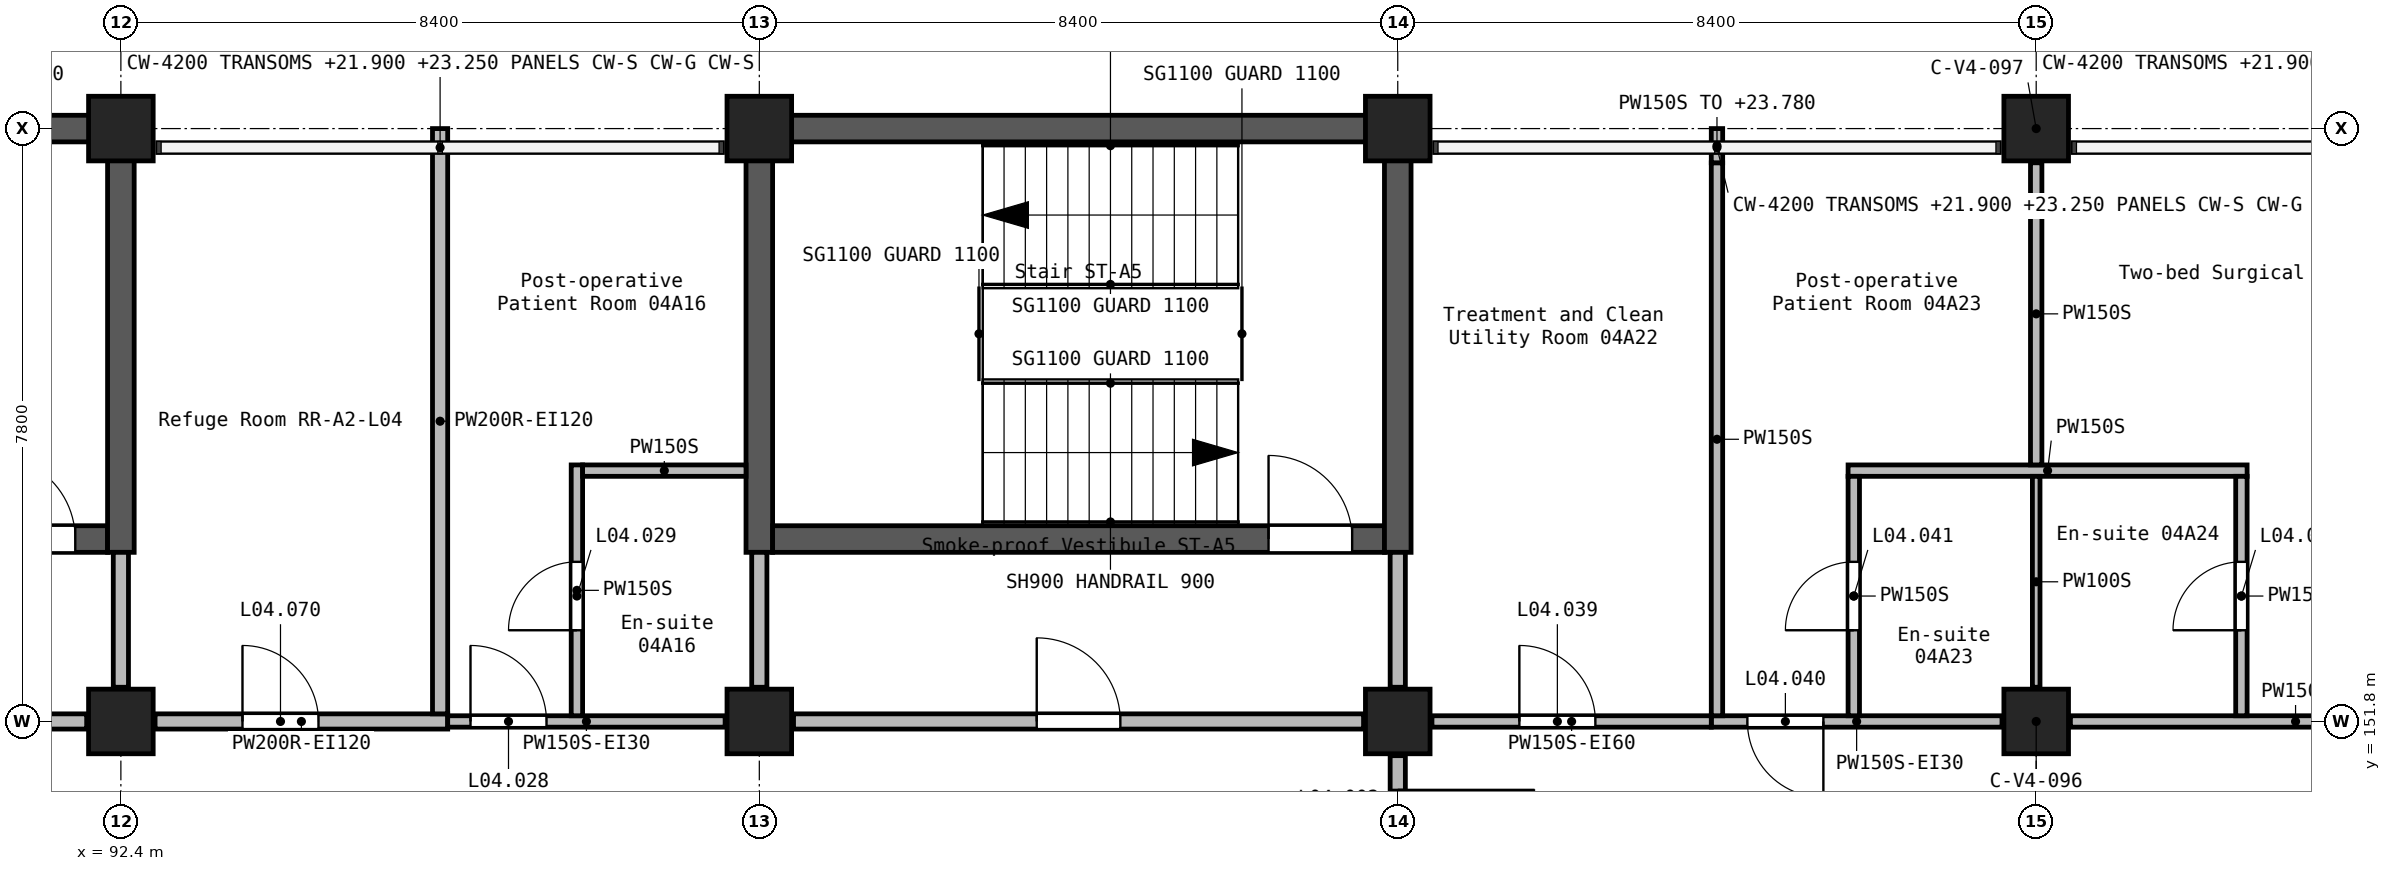
"""IFC4 building model, lengths in metres.
Left out: names, types, materials, properties, quantities, classifications, styles, units other than length and angle.
Written with IfcOpenShell. Run it as: python <this file> out.ifc"""

import sys

from ifc_helpers import new_model, si_unit, direction, frame, frame_2d, origin, origin_2d, place, context, subcontext, project, spatial, rectangle, extrude, element, fill, save


model = new_model("IFC4")
c1 = context("Model", 3, precision=1e-05, world=origin(), true_north=direction((0.0, 1.0)))
c2 = subcontext(c1, "Body", "Model", "MODEL_VIEW")
j1 = project(units=[si_unit("LENGTHUNIT", "METRE"), si_unit("PLANEANGLEUNIT", "RADIAN")], contexts=[c1])
p1 = place(None, origin())
s1 = spatial("IfcSite", under=j1, at=p1, CompositionType="ELEMENT")
p2 = place(p1, origin())
s2 = spatial("IfcBuilding", under=s1, at=p2, CompositionType="ELEMENT")
p3 = place(p2, frame((0.0, 0.0, 21.0)))
s3 = spatial("IfcBuildingStorey", under=s2, at=p3, CompositionType="ELEMENT", Elevation=21.0)
for number, where, z_axis, x_axis in (
    (1, (92.4, 151.8, 0.0), (0.0, 0.0, 1.0), (1.0, 0.0, 0.0)),
    (2, (92.4, 159.6, 0.0), (0.0, 0.0, 1.0), (1.0, 0.0, 0.0)),
    (3, (100.8, 151.8, 0.0), (0.0, 0.0, 1.0), (1.0, 0.0, 0.0)),
    (4, (100.8, 159.6, 0.0), (0.0, 0.0, 1.0), (1.0, 0.0, 0.0)),
    (5, (109.2, 151.8, 0.0), (0.0, 0.0, 1.0), (1.0, 0.0, 0.0)),
    (6, (109.2, 159.6, 0.0), (0.0, 0.0, 1.0), (1.0, 0.0, 0.0)),
    (7, (117.6, 151.8, 0.0), (0.0, 0.0, 1.0), (1.0, 0.0, 0.0)),
    (8, (117.6, 159.6, 0.0), (0.0, 0.0, 1.0), (1.0, 0.0, 0.0)),
):
    element("IfcColumn", number, at=place(p3, frame(where, z_axis=z_axis, x_axis=x_axis)), inside=s3, PredefinedType="COLUMN", context=c2, shape_type="SweptSolid", body=[
        extrude(rectangle(XDim=0.85, YDim=0.85, at=origin_2d()), origin(), (0.0, 0.0, 1.0), 3.9),
    ])
p4 = place(p3, frame((83.825, 159.6, 0.0), z_axis=(0.0, 0.0, 1.0), x_axis=(1.0, 0.0, 0.0)))
e9 = element("IfcWall", 9, at=p4, inside=s3, PredefinedType="SHEAR", context=c2, shape_type="SweptSolid", body=[
    extrude(rectangle(XDim=8.4, YDim=0.35, at=frame_2d((4.2, 0.0))), origin(), (0.0, 0.0, 1.0), 3.9),
])
p5 = place(p3, frame((84.175, 154.2, 0.0), z_axis=(0.0, 0.0, 1.0), x_axis=(1.0, 0.0, 0.0)))
e10 = element("IfcWall", 10, at=p5, inside=s3, PredefinedType="SHEAR", context=c2, shape_type="SweptSolid", body=[
    extrude(rectangle(XDim=8.05, YDim=0.35, at=frame_2d((4.025, 0.0))), origin(), (0.0, 0.0, 1.0), 3.9),
])
p6 = place(p5, frame((6.525, 0.0, 0.0)))
e11 = element("IfcOpeningElement", 11, at=p6, cuts=e10, PredefinedType="OPENING", context=c2, shape_type="SweptSolid", body=[
    extrude(rectangle(XDim=1.1, YDim=2.1, at=frame_2d((0.55, 1.05))), frame((0.0, 0.185, 0.0), z_axis=(0.0, -1.0, 0.0), x_axis=(1.0, 0.0, 0.0)), (0.0, 0.0, 1.0), 0.37),
])
p7 = place(p3, frame((92.4, 154.025, 0.0), z_axis=(0.0, 0.0, 1.0), x_axis=(0.0, 1.0, 0.0)))
e12 = element("IfcWall", 12, at=p7, inside=s3, PredefinedType="SHEAR", context=c2, shape_type="SweptSolid", body=[
    extrude(rectangle(XDim=5.75, YDim=0.35, at=frame_2d((2.875, 0.0))), origin(), (0.0, 0.0, 1.0), 3.9),
])
p8 = place(p3, frame((100.625, 159.6, 0.0), z_axis=(0.0, 0.0, 1.0), x_axis=(1.0, 0.0, 0.0)))
e13 = element("IfcWall", 13, at=p8, inside=s3, PredefinedType="SHEAR", context=c2, shape_type="SweptSolid", body=[
    extrude(rectangle(XDim=8.4, YDim=0.35, at=frame_2d((4.2, 0.0))), origin(), (0.0, 0.0, 1.0), 3.9),
])
p9 = place(p3, frame((100.8, 154.025, 0.0), z_axis=(0.0, 0.0, 1.0), x_axis=(0.0, 1.0, 0.0)))
e14 = element("IfcWall", 14, at=p9, inside=s3, PredefinedType="SHEAR", context=c2, shape_type="SweptSolid", body=[
    extrude(rectangle(XDim=5.4, YDim=0.35, at=frame_2d((2.7, 0.0))), origin(), (0.0, 0.0, 1.0), 3.9),
])
p10 = place(p3, frame((100.975, 154.2, 0.0), z_axis=(0.0, 0.0, 1.0), x_axis=(1.0, 0.0, 0.0)))
e15 = element("IfcWall", 15, at=p10, inside=s3, PredefinedType="SHEAR", context=c2, shape_type="SweptSolid", body=[
    extrude(rectangle(XDim=8.05, YDim=0.35, at=frame_2d((4.025, 0.0))), origin(), (0.0, 0.0, 1.0), 3.9),
])
p11 = place(p10, frame((6.525, 0.0, 0.0)))
e16 = element("IfcOpeningElement", 16, at=p11, cuts=e15, PredefinedType="OPENING", context=c2, shape_type="SweptSolid", body=[
    extrude(rectangle(XDim=1.1, YDim=2.1, at=frame_2d((0.55, 1.05))), frame((0.0, 0.185, 0.0), z_axis=(0.0, -1.0, 0.0), x_axis=(1.0, 0.0, 0.0)), (0.0, 0.0, 1.0), 0.37),
])
p12 = place(p3, frame((109.2, 154.025, 0.0), z_axis=(0.0, 0.0, 1.0), x_axis=(0.0, 1.0, 0.0)))
e17 = element("IfcWall", 17, at=p12, inside=s3, PredefinedType="SHEAR", context=c2, shape_type="SweptSolid", body=[
    extrude(rectangle(XDim=5.75, YDim=0.35, at=frame_2d((2.875, 0.0))), origin(), (0.0, 0.0, 1.0), 3.9),
])
p13 = place(p3, frame((109.2, 154.025, 0.0), z_axis=(0.0, 0.0, 1.0), x_axis=(0.0, -1.0, 0.0)))
e18 = element("IfcWall", 18, at=p13, inside=s3, PredefinedType="SOLIDWALL", context=c2, shape_type="SweptSolid", body=[
    extrude(rectangle(XDim=1.775, YDim=0.2, at=frame_2d((0.887, 0.0))), origin(), (0.0, 0.0, 1.0), 3.6),
])
p14 = place(p3, frame((109.2, 151.35, 0.0), z_axis=(0.0, 0.0, 1.0), x_axis=(0.0, -1.0, 0.0)))
e19 = element("IfcWall", 19, at=p14, inside=s3, PredefinedType="SOLIDWALL", context=c2, shape_type="SweptSolid", body=[
    extrude(rectangle(XDim=2.7, YDim=0.2, at=frame_2d((1.35, 0.0))), origin(), (0.0, 0.0, 1.0), 3.6),
])
p15 = place(p14, frame((0.45, 0.0, 0.0)))
e20 = element("IfcOpeningElement", 20, at=p15, cuts=e19, PredefinedType="OPENING", context=c2, shape_type="SweptSolid", body=[
    extrude(rectangle(XDim=1.8, YDim=2.1, at=frame_2d((0.9, 1.05))), frame((0.0, 0.11, 0.0), z_axis=(0.0, -1.0, 0.0), x_axis=(1.0, 0.0, 0.0)), (0.0, 0.0, 1.0), 0.22),
])
p16 = place(p3, frame((84.45, 151.8, 0.0), z_axis=(0.0, 0.0, 1.0), x_axis=(1.0, 0.0, 0.0)))
e21 = element("IfcWall", 21, at=p16, inside=s3, PredefinedType="SOLIDWALL", context=c2, shape_type="SweptSolid", body=[
    extrude(rectangle(XDim=7.5, YDim=0.2, at=frame_2d((3.75, 0.0))), origin(), (0.0, 0.0, 1.0), 3.6),
])
p17 = place(p16, frame((3.2, 0.0, 0.0)))
e22 = element("IfcOpeningElement", 22, at=p17, cuts=e21, PredefinedType="OPENING", context=c2, shape_type="SweptSolid", body=[
    extrude(rectangle(XDim=1.1, YDim=2.1, at=frame_2d((0.55, 1.05))), frame((0.0, 0.11, 0.0), z_axis=(0.0, -1.0, 0.0), x_axis=(1.0, 0.0, 0.0)), (0.0, 0.0, 1.0), 0.22),
])
p18 = place(p3, frame((92.85, 151.8, 0.0), z_axis=(0.0, 0.0, 1.0), x_axis=(1.0, 0.0, 0.0)))
e23 = element("IfcWall", 23, at=p18, inside=s3, PredefinedType="SOLIDWALL", context=c2, shape_type="SweptSolid", body=[
    extrude(rectangle(XDim=3.85, YDim=0.2, at=frame_2d((1.925, 0.0))), origin(), (0.0, 0.0, 1.0), 3.6),
])
p19 = place(p18, frame((1.15, 0.0, 0.0)))
e24 = element("IfcOpeningElement", 24, at=p19, cuts=e23, PredefinedType="OPENING", context=c2, shape_type="SweptSolid", body=[
    extrude(rectangle(XDim=1.0, YDim=2.1, at=frame_2d((0.5, 1.05))), frame((0.0, 0.11, 0.0), z_axis=(0.0, -1.0, 0.0), x_axis=(1.0, 0.0, 0.0)), (0.0, 0.0, 1.0), 0.22),
])
p20 = place(p3, frame((92.4, 152.25, 0.0), z_axis=(0.0, 0.0, 1.0), x_axis=(0.0, 1.0, 0.0)))
e25 = element("IfcWall", 25, at=p20, inside=s3, PredefinedType="SOLIDWALL", context=c2, shape_type="SweptSolid", body=[
    extrude(rectangle(XDim=1.775, YDim=0.2, at=frame_2d((0.887, 0.0))), origin(), (0.0, 0.0, 1.0), 3.6),
])
p21 = place(p3, frame((101.25, 151.8, 0.0), z_axis=(0.0, 0.0, 1.0), x_axis=(1.0, 0.0, 0.0)))
e26 = element("IfcWall", 26, at=p21, inside=s3, PredefinedType="SOLIDWALL", context=c2, shape_type="SweptSolid", body=[
    extrude(rectangle(XDim=7.5, YDim=0.2, at=frame_2d((3.75, 0.0))), origin(), (0.0, 0.0, 1.0), 3.6),
])
p22 = place(p21, frame((3.2, 0.0, 0.0)))
e27 = element("IfcOpeningElement", 27, at=p22, cuts=e26, PredefinedType="OPENING", context=c2, shape_type="SweptSolid", body=[
    extrude(rectangle(XDim=1.1, YDim=2.1, at=frame_2d((0.55, 1.05))), frame((0.0, 0.11, 0.0), z_axis=(0.0, -1.0, 0.0), x_axis=(1.0, 0.0, 0.0)), (0.0, 0.0, 1.0), 0.22),
])
p23 = place(p3, frame((96.6, 151.9, 0.0), z_axis=(0.0, 0.0, 1.0), x_axis=(0.0, 1.0, 0.0)))
e28 = element("IfcWall", 28, at=p23, inside=s3, PredefinedType="SOLIDWALL", context=c2, shape_type="SweptSolid", body=[
    extrude(rectangle(XDim=7.7, YDim=0.2, at=frame_2d((3.85, 0.0))), origin(), (0.0, 0.0, 1.0), 3.6),
])
p24 = place(p3, frame((100.8, 152.25, 0.0), z_axis=(0.0, 0.0, 1.0), x_axis=(0.0, 1.0, 0.0)))
e29 = element("IfcWall", 29, at=p24, inside=s3, PredefinedType="SOLIDWALL", context=c2, shape_type="SweptSolid", body=[
    extrude(rectangle(XDim=1.775, YDim=0.2, at=frame_2d((0.887, 0.0))), origin(), (0.0, 0.0, 1.0), 3.6),
])
p25 = place(p3, frame((123.975, 151.8, 0.0), z_axis=(0.0, 0.0, 1.0), x_axis=(-1.0, 0.0, 0.0)))
e30 = element("IfcWall", 30, at=p25, inside=s3, PredefinedType="PARTITIONING", context=c2, shape_type="SweptSolid", body=[
    extrude(rectangle(XDim=5.925, YDim=0.15, at=frame_2d((2.962, 0.0))), origin(), (0.0, 0.0, 1.0), 3.6),
])
p26 = place(p25, frame((1.375, 0.0, 0.0)))
e31 = element("IfcOpeningElement", 31, at=p26, cuts=e30, PredefinedType="OPENING", context=c2, shape_type="SweptSolid", body=[
    extrude(rectangle(XDim=1.0, YDim=2.1, at=frame_2d((0.5, 1.05))), frame((0.0, 0.085, 0.0), z_axis=(0.0, -1.0, 0.0), x_axis=(1.0, 0.0, 0.0)), (0.0, 0.0, 1.0), 0.17),
])
p27 = place(p3, frame((117.15, 151.8, 0.0), z_axis=(0.0, 0.0, 1.0), x_axis=(-1.0, 0.0, 0.0)))
e32 = element("IfcWall", 32, at=p27, inside=s3, PredefinedType="PARTITIONING", context=c2, shape_type="SweptSolid", body=[
    extrude(rectangle(XDim=3.825, YDim=0.15, at=frame_2d((1.913, 0.0))), origin(), (0.0, 0.0, 1.0), 3.6),
])
p28 = place(p27, frame((2.35, 0.0, 0.0)))
e33 = element("IfcOpeningElement", 33, at=p28, cuts=e32, PredefinedType="OPENING", context=c2, shape_type="SweptSolid", body=[
    extrude(rectangle(XDim=1.0, YDim=2.1, at=frame_2d((0.5, 1.05))), frame((0.0, 0.085, 0.0), z_axis=(0.0, -1.0, 0.0), x_axis=(1.0, 0.0, 0.0)), (0.0, 0.0, 1.0), 0.17),
])
p29 = place(p3, frame((96.7, 151.8, 0.0), z_axis=(0.0, 0.0, 1.0), x_axis=(1.0, 0.0, 0.0)))
e34 = element("IfcWall", 34, at=p29, inside=s3, PredefinedType="PARTITIONING", context=c2, shape_type="SweptSolid", body=[
    extrude(rectangle(XDim=3.65, YDim=0.15, at=frame_2d((1.825, 0.0))), origin(), (0.0, 0.0, 1.0), 3.6),
])
p30 = place(p29, frame((0.3, 0.0, 0.0)))
e35 = element("IfcOpeningElement", 35, at=p30, cuts=e34, PredefinedType="OPENING", context=c2, shape_type="SweptSolid", body=[
    extrude(rectangle(XDim=1.0, YDim=2.1, at=frame_2d((0.5, 1.05))), frame((0.0, 0.085, 0.0), z_axis=(0.0, -1.0, 0.0), x_axis=(1.0, 0.0, 0.0)), (0.0, 0.0, 1.0), 0.17),
])
p31 = place(p3, frame((109.65, 151.8, 0.0), z_axis=(0.0, 0.0, 1.0), x_axis=(1.0, 0.0, 0.0)))
e36 = element("IfcWall", 36, at=p31, inside=s3, PredefinedType="PARTITIONING", context=c2, shape_type="SweptSolid", body=[
    extrude(rectangle(XDim=3.675, YDim=0.15, at=frame_2d((1.837, 0.0))), origin(), (0.0, 0.0, 1.0), 3.6),
])
p32 = place(p31, frame((1.15, 0.0, 0.0)))
e37 = element("IfcOpeningElement", 37, at=p32, cuts=e36, PredefinedType="OPENING", context=c2, shape_type="SweptSolid", body=[
    extrude(rectangle(XDim=1.0, YDim=2.1, at=frame_2d((0.5, 1.05))), frame((0.0, 0.085, 0.0), z_axis=(0.0, -1.0, 0.0), x_axis=(1.0, 0.0, 0.0)), (0.0, 0.0, 1.0), 0.17),
])
p33 = place(p3, frame((113.4, 151.875, 0.0), z_axis=(0.0, 0.0, 1.0), x_axis=(0.0, 1.0, 0.0)))
e38 = element("IfcWall", 38, at=p33, inside=s3, PredefinedType="PARTITIONING", context=c2, shape_type="SweptSolid", body=[
    extrude(rectangle(XDim=7.275, YDim=0.15, at=frame_2d((3.637, 0.0))), origin(), (0.0, 0.0, 1.0), 3.6),
])
p34 = place(p3, frame((113.4, 159.15, 0.0), z_axis=(0.0, 0.0, 1.0), x_axis=(0.0, 1.0, 0.0)))
e39 = element("IfcWall", 39, at=p34, inside=s3, PredefinedType="PARTITIONING", context=c2, shape_type="SweptSolid", body=[
    extrude(rectangle(XDim=0.45, YDim=0.15, at=frame_2d((0.225, 0.0))), origin(), (0.0, 0.0, 1.0), 2.78),
])
p35 = place(p3, frame((115.125, 155.1, 0.0), z_axis=(0.0, 0.0, 1.0), x_axis=(1.0, 0.0, 0.0)))
e40 = element("IfcWall", 40, at=p35, inside=s3, PredefinedType="PARTITIONING", context=c2, shape_type="SweptSolid", body=[
    extrude(rectangle(XDim=5.25, YDim=0.15, at=frame_2d((2.625, 0.0))), origin(), (0.0, 0.0, 1.0), 3.6),
])
p36 = place(p3, frame((117.6, 155.175, 0.0), z_axis=(0.0, 0.0, 1.0), x_axis=(0.0, 1.0, 0.0)))
e41 = element("IfcWall", 41, at=p36, inside=s3, PredefinedType="PARTITIONING", context=c2, shape_type="SweptSolid", body=[
    extrude(rectangle(XDim=3.975, YDim=0.15, at=frame_2d((1.987, 0.0))), origin(), (0.0, 0.0, 1.0), 3.6),
])
p37 = place(p3, frame((98.4, 151.875, 0.0), z_axis=(0.0, 0.0, 1.0), x_axis=(0.0, 1.0, 0.0)))
e42 = element("IfcWall", 42, at=p37, inside=s3, PredefinedType="PARTITIONING", context=c2, shape_type="SweptSolid", body=[
    extrude(rectangle(XDim=3.3, YDim=0.15, at=frame_2d((1.65, 0.0))), origin(), (0.0, 0.0, 1.0), 3.6),
])
p38 = place(p37, frame((1.125, 0.0, 0.0)))
e43 = element("IfcOpeningElement", 43, at=p38, cuts=e42, PredefinedType="OPENING", context=c2, shape_type="SweptSolid", body=[
    extrude(rectangle(XDim=0.9, YDim=2.1, at=frame_2d((0.45, 1.05))), frame((0.0, 0.085, 0.0), z_axis=(0.0, -1.0, 0.0), x_axis=(1.0, 0.0, 0.0)), (0.0, 0.0, 1.0), 0.17),
])
p39 = place(p3, frame((115.2, 151.875, 0.0), z_axis=(0.0, 0.0, 1.0), x_axis=(0.0, 1.0, 0.0)))
e44 = element("IfcWall", 44, at=p39, inside=s3, PredefinedType="PARTITIONING", context=c2, shape_type="SweptSolid", body=[
    extrude(rectangle(XDim=3.15, YDim=0.15, at=frame_2d((1.575, 0.0))), origin(), (0.0, 0.0, 1.0), 3.6),
])
p40 = place(p39, frame((1.125, 0.0, 0.0)))
e45 = element("IfcOpeningElement", 45, at=p40, cuts=e44, PredefinedType="OPENING", context=c2, shape_type="SweptSolid", body=[
    extrude(rectangle(XDim=0.9, YDim=2.1, at=frame_2d((0.45, 1.05))), frame((0.0, 0.085, 0.0), z_axis=(0.0, -1.0, 0.0), x_axis=(1.0, 0.0, 0.0)), (0.0, 0.0, 1.0), 0.17),
])
p41 = place(p3, frame((120.3, 151.875, 0.0), z_axis=(0.0, 0.0, 1.0), x_axis=(0.0, 1.0, 0.0)))
e46 = element("IfcWall", 46, at=p41, inside=s3, PredefinedType="PARTITIONING", context=c2, shape_type="SweptSolid", body=[
    extrude(rectangle(XDim=3.15, YDim=0.15, at=frame_2d((1.575, 0.0))), origin(), (0.0, 0.0, 1.0), 3.6),
])
p42 = place(p41, frame((1.125, 0.0, 0.0)))
e47 = element("IfcOpeningElement", 47, at=p42, cuts=e46, PredefinedType="OPENING", context=c2, shape_type="SweptSolid", body=[
    extrude(rectangle(XDim=0.9, YDim=2.1, at=frame_2d((0.45, 1.05))), frame((0.0, 0.085, 0.0), z_axis=(0.0, -1.0, 0.0), x_axis=(1.0, 0.0, 0.0)), (0.0, 0.0, 1.0), 0.17),
])
p43 = place(p3, frame((98.475, 155.1, 0.0), z_axis=(0.0, 0.0, 1.0), x_axis=(1.0, 0.0, 0.0)))
e48 = element("IfcWall", 48, at=p43, inside=s3, PredefinedType="PARTITIONING", context=c2, shape_type="SweptSolid", body=[
    extrude(rectangle(XDim=2.15, YDim=0.15, at=frame_2d((1.075, 0.0))), origin(), (0.0, 0.0, 1.0), 3.6),
])
p44 = place(p3, frame((117.6, 152.25, 0.0), z_axis=(0.0, 0.0, 1.0), x_axis=(0.0, 1.0, 0.0)))
e49 = element("IfcWall", 49, at=p44, inside=s3, PredefinedType="PARTITIONING", context=c2, shape_type="SweptSolid", body=[
    extrude(rectangle(XDim=2.775, YDim=0.1, at=frame_2d((1.387, 0.0))), origin(), (0.0, 0.0, 1.0), 3.6),
])
p45 = place(p15, origin())
e50 = element("IfcDoor", 50, at=p45, inside=s3, OperationType="DOUBLE_DOOR_SINGLE_SWING", PredefinedType="DOOR", context=c2, shape_type="SweptSolid", body=[
    extrude(rectangle(XDim=1.8, YDim=2.1, at=frame_2d((0.9, 1.05))), frame((0.0, 0.025, 0.0), z_axis=(0.0, -1.0, 0.0), x_axis=(1.0, 0.0, 0.0)), (0.0, 0.0, 1.0), 0.05),
])
fill(e20, e50)
p46 = place(p30, origin())
e51 = element("IfcDoor", 51, at=p46, inside=s3, OperationType="SINGLE_SWING_LEFT", PredefinedType="DOOR", context=c2, shape_type="SweptSolid", body=[
    extrude(rectangle(XDim=1.0, YDim=2.1, at=frame_2d((0.5, 1.05))), frame((0.0, 0.025, 0.0), z_axis=(0.0, -1.0, 0.0), x_axis=(1.0, 0.0, 0.0)), (0.0, 0.0, 1.0), 0.05),
])
fill(e35, e51)
p47 = place(p38, frame((0.9, 0.0, 0.0), z_axis=(0.0, 0.0, 1.0), x_axis=(-1.0, 0.0, 0.0)))
e52 = element("IfcDoor", 52, at=p47, inside=s3, OperationType="SINGLE_SWING_RIGHT", PredefinedType="DOOR", context=c2, shape_type="SweptSolid", body=[
    extrude(rectangle(XDim=0.9, YDim=2.1, at=frame_2d((0.45, 1.05))), frame((0.0, 0.025, 0.0), z_axis=(0.0, -1.0, 0.0), x_axis=(1.0, 0.0, 0.0)), (0.0, 0.0, 1.0), 0.05),
])
fill(e43, e52)
p48 = place(p32, origin())
e53 = element("IfcDoor", 53, at=p48, inside=s3, OperationType="SINGLE_SWING_LEFT", PredefinedType="DOOR", context=c2, shape_type="SweptSolid", body=[
    extrude(rectangle(XDim=1.0, YDim=2.1, at=frame_2d((0.5, 1.05))), frame((0.0, 0.025, 0.0), z_axis=(0.0, -1.0, 0.0), x_axis=(1.0, 0.0, 0.0)), (0.0, 0.0, 1.0), 0.05),
])
fill(e37, e53)
p49 = place(p28, frame((1.0, 0.0, 0.0), z_axis=(0.0, 0.0, 1.0), x_axis=(-1.0, 0.0, 0.0)))
e54 = element("IfcDoor", 54, at=p49, inside=s3, OperationType="SINGLE_SWING_LEFT", PredefinedType="DOOR", context=c2, shape_type="SweptSolid", body=[
    extrude(rectangle(XDim=1.0, YDim=2.1, at=frame_2d((0.5, 1.05))), frame((0.0, 0.025, 0.0), z_axis=(0.0, -1.0, 0.0), x_axis=(1.0, 0.0, 0.0)), (0.0, 0.0, 1.0), 0.05),
])
fill(e33, e54)
p50 = place(p40, frame((0.9, 0.0, 0.0), z_axis=(0.0, 0.0, 1.0), x_axis=(-1.0, 0.0, 0.0)))
e55 = element("IfcDoor", 55, at=p50, inside=s3, OperationType="SINGLE_SWING_LEFT", PredefinedType="DOOR", context=c2, shape_type="SweptSolid", body=[
    extrude(rectangle(XDim=0.9, YDim=2.1, at=frame_2d((0.45, 1.05))), frame((0.0, 0.025, 0.0), z_axis=(0.0, -1.0, 0.0), x_axis=(1.0, 0.0, 0.0)), (0.0, 0.0, 1.0), 0.05),
])
fill(e45, e55)
p51 = place(p42, origin())
e56 = element("IfcDoor", 56, at=p51, inside=s3, OperationType="SINGLE_SWING_RIGHT", PredefinedType="DOOR", context=c2, shape_type="SweptSolid", body=[
    extrude(rectangle(XDim=0.9, YDim=2.1, at=frame_2d((0.45, 1.05))), frame((0.0, 0.025, 0.0), z_axis=(0.0, -1.0, 0.0), x_axis=(1.0, 0.0, 0.0)), (0.0, 0.0, 1.0), 0.05),
])
fill(e47, e56)
p52 = place(p19, origin())
e57 = element("IfcDoor", 57, at=p52, inside=s3, OperationType="SINGLE_SWING_LEFT", PredefinedType="DOOR", context=c2, shape_type="SweptSolid", body=[
    extrude(rectangle(XDim=1.0, YDim=2.1, at=frame_2d((0.5, 1.05))), frame((0.0, 0.025, 0.0), z_axis=(0.0, -1.0, 0.0), x_axis=(1.0, 0.0, 0.0)), (0.0, 0.0, 1.0), 0.05),
])
fill(e24, e57)
p53 = place(p6, origin())
e58 = element("IfcDoor", 58, at=p53, inside=s3, OperationType="SINGLE_SWING_RIGHT", PredefinedType="DOOR", context=c2, shape_type="SweptSolid", body=[
    extrude(rectangle(XDim=1.1, YDim=2.1, at=frame_2d((0.55, 1.05))), frame((0.0, 0.025, 0.0), z_axis=(0.0, -1.0, 0.0), x_axis=(1.0, 0.0, 0.0)), (0.0, 0.0, 1.0), 0.05),
])
fill(e11, e58)
p54 = place(p11, origin())
e59 = element("IfcDoor", 59, at=p54, inside=s3, OperationType="SINGLE_SWING_RIGHT", PredefinedType="DOOR", context=c2, shape_type="SweptSolid", body=[
    extrude(rectangle(XDim=1.1, YDim=2.1, at=frame_2d((0.55, 1.05))), frame((0.0, 0.025, 0.0), z_axis=(0.0, -1.0, 0.0), x_axis=(1.0, 0.0, 0.0)), (0.0, 0.0, 1.0), 0.05),
])
fill(e16, e59)
p55 = place(p22, origin())
e60 = element("IfcDoor", 60, at=p55, inside=s3, OperationType="SINGLE_SWING_RIGHT", PredefinedType="DOOR", context=c2, shape_type="SweptSolid", body=[
    extrude(rectangle(XDim=1.1, YDim=2.1, at=frame_2d((0.55, 1.05))), frame((0.0, 0.025, 0.0), z_axis=(0.0, -1.0, 0.0), x_axis=(1.0, 0.0, 0.0)), (0.0, 0.0, 1.0), 0.05),
])
fill(e27, e60)
save(model, sys.argv[1])
